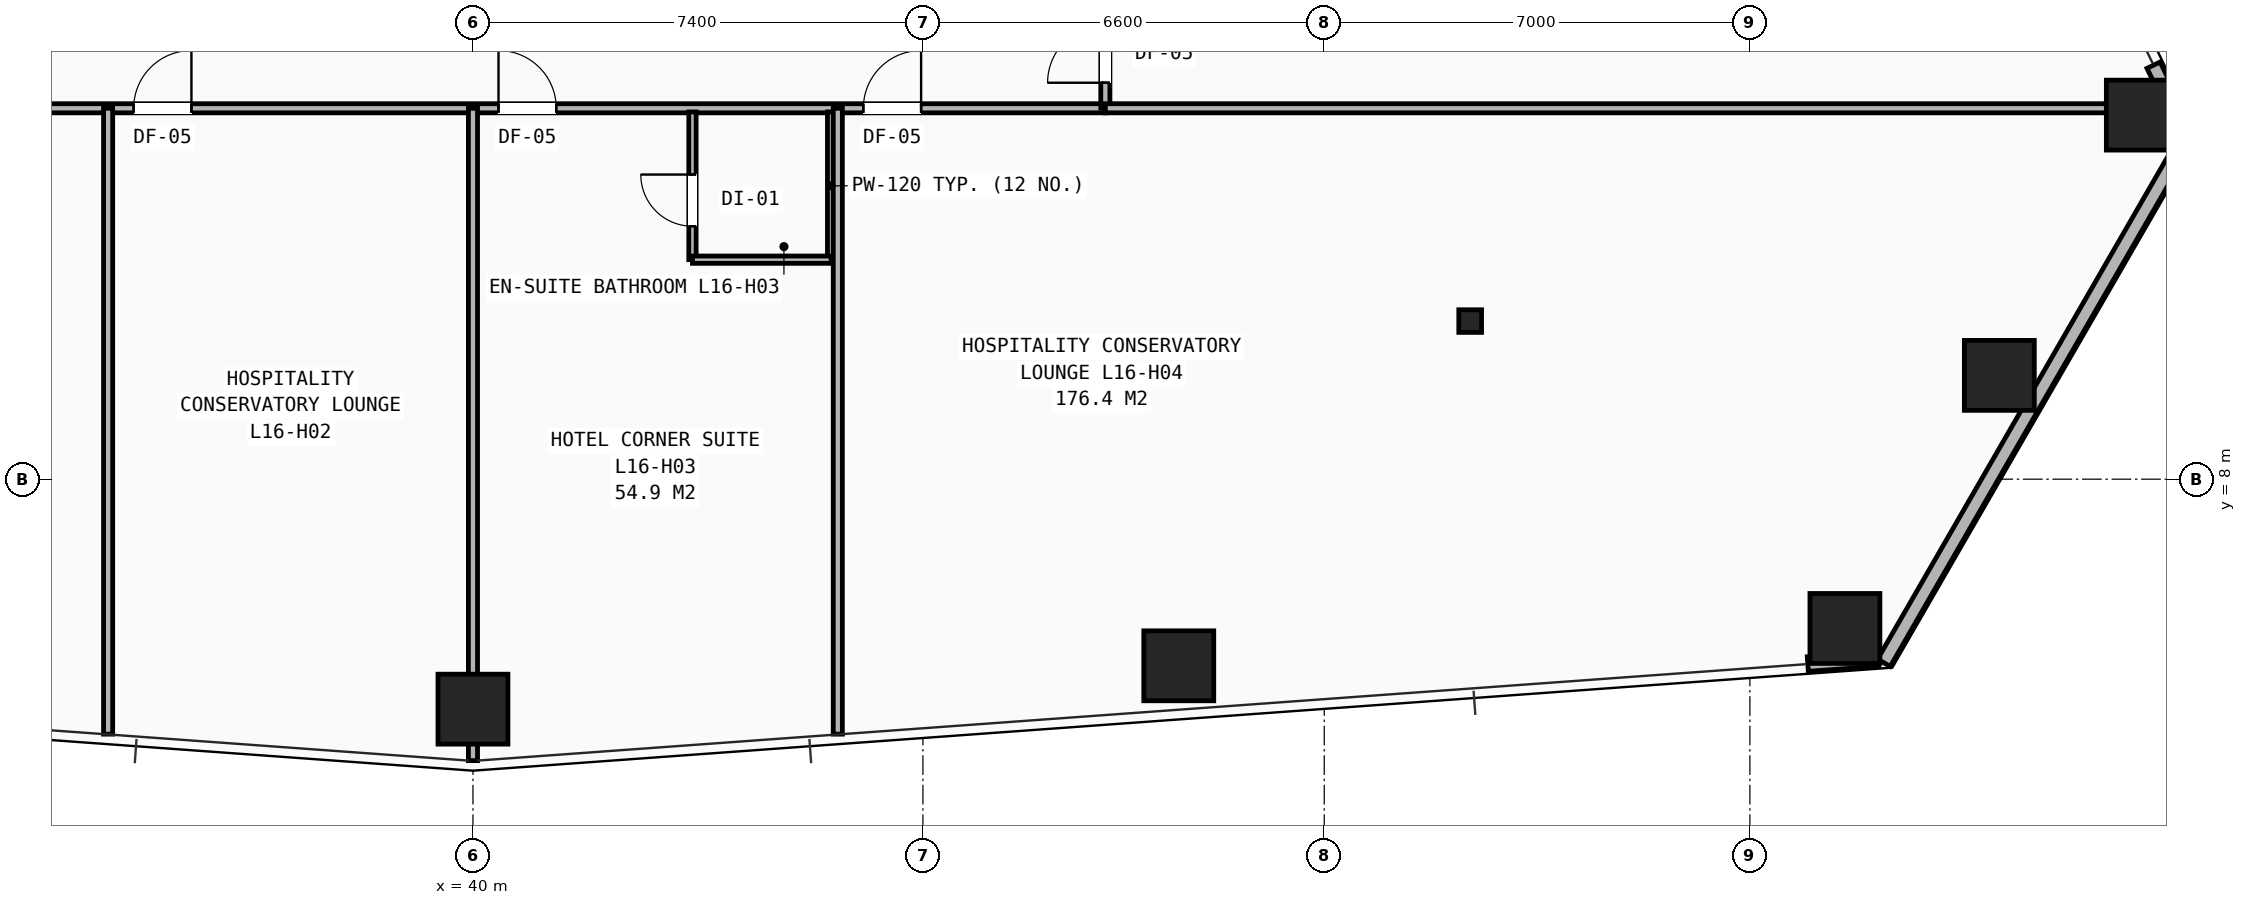
"""IFC4 building model, lengths in metres.
Left out: names, types, materials, properties, quantities, classifications, styles, units other than length and angle.
Written with IfcOpenShell. Run it as: python <this file> out.ifc"""

import sys

from ifc_helpers import new_model, si_unit, direction, frame, frame_2d, origin, origin_2d, place, context, subcontext, project, spatial, rectangle, hollow_rectangle, i_section, extrude, element, fill, save


model = new_model("IFC4")
c1 = context("Model", 3, precision=1e-05, world=origin(), true_north=direction((0.0, 1.0)))
c2 = subcontext(c1, "Body", "Model", "MODEL_VIEW")
j1 = project(units=[si_unit("LENGTHUNIT", "METRE"), si_unit("PLANEANGLEUNIT", "RADIAN")], contexts=[c1])
p1 = place(None, origin())
s1 = spatial("IfcSite", under=j1, at=p1, CompositionType="ELEMENT")
p2 = place(p1, origin())
s2 = spatial("IfcBuilding", under=s1, at=p2, CompositionType="ELEMENT")
p3 = place(p2, frame((0.0, 0.0, 59.2)))
s3 = spatial("IfcBuildingStorey", under=s2, at=p3, CompositionType="ELEMENT", Elevation=59.2)
p4 = place(p3, frame((56.4, 10.6, 0.0), z_axis=(0.0, 0.0, 1.0), x_axis=(1.0, 0.0, 0.0)))
e1 = element("IfcColumn", 1, at=p4, inside=s3, PredefinedType="COLUMN", context=c2, shape_type="SweptSolid", body=[
    extrude(i_section(OverallWidth=0.374, OverallDepth=0.372, WebThickness=0.016, FlangeThickness=0.026, at=origin_2d()), origin(), (0.0, 0.0, 1.0), 3.2),
])
for number, where, z_axis, x_axis in (
    (2, (40.0, 4.218, 0.0), (0.0, 0.0, 1.0), (1.0, 0.0, 0.0)),
    (3, (51.608, 4.93, 0.0), (0.0, 0.0, 1.0), (1.0, 0.0, 0.0)),
    (4, (62.563, 5.545, 0.0), (0.0, 0.0, 1.0), (1.0, 0.0, 0.0)),
    (5, (65.102, 9.707, 0.0), (0.0, 0.0, 1.0), (1.0, 0.0, 0.0)),
    (6, (67.437, 13.988, 0.0), (0.0, 0.0, 1.0), (1.0, 0.0, 0.0)),
):
    element("IfcColumn", number, at=place(p3, frame(where, z_axis=z_axis, x_axis=x_axis)), inside=s3, PredefinedType="COLUMN", context=c2, shape_type="SweptSolid", body=[
        extrude(hollow_rectangle(XDim=1.15, YDim=1.15, WallThickness=0.075, at=origin_2d()), origin(), (0.0, 0.0, 1.0), 3.2),
    ])
p5 = place(p3, frame((61.952, 4.959, 0.0), z_axis=(0.0, 0.0, 1.0), x_axis=(0.997371614967, 0.072455929072, 0.0)))
e7 = element("IfcWall", 7, at=p5, inside=s3, PredefinedType="SHEAR", context=c2, shape_type="SweptSolid", body=[
    extrude(rectangle(XDim=1.163, YDim=0.24, at=frame_2d((0.581, 0.0))), origin(), (0.0, 0.0, 1.0), 2.263),
])
p6 = place(p3, frame((68.247, 13.715, 0.0), z_axis=(0.0, 0.0, 1.0), x_axis=(-0.499984376209, -0.866034423996, 0.0)))
e8 = element("IfcWall", 8, at=p6, inside=s3, PredefinedType="SHEAR", context=c2, shape_type="SweptSolid", body=[
    extrude(rectangle(XDim=10.086, YDim=0.24, at=frame_2d((5.043, 0.0))), origin(), (0.0, 0.0, 1.0), 2.263),
])
p7 = place(p3, frame((68.146, 13.763, 0.0), z_axis=(0.0, 0.0, 1.0), x_axis=(-0.436005533542, 0.899943984213, 0.0)))
e9 = element("IfcWall", 9, at=p7, inside=s3, PredefinedType="SHEAR", context=c2, shape_type="SweptSolid", body=[
    extrude(rectangle(XDim=1.162, YDim=0.24, at=frame_2d((0.581, 0.0))), origin(), (0.0, 0.0, 1.0), 2.263),
])
p8 = place(p3, frame((29.6, 14.1, 0.0), z_axis=(0.0, 0.0, 1.0), x_axis=(1.0, 0.0, 0.0)))
e10 = element("IfcWall", 10, at=p8, inside=s3, PredefinedType="PARTITIONING", context=c2, shape_type="SweptSolid", body=[
    extrude(rectangle(XDim=20.8, YDim=0.15, at=frame_2d((10.4, 0.0))), origin(), (0.0, 0.0, 1.0), 2.191),
])
p9 = place(p8, frame((0.57, 0.0, 0.0)))
e11 = element("IfcOpeningElement", 11, at=p9, cuts=e10, PredefinedType="OPENING", context=c2, shape_type="SweptSolid", body=[
    extrude(rectangle(XDim=0.95, YDim=2.1, at=frame_2d((0.475, 1.05))), frame((0.0, 0.085, 0.0), z_axis=(0.0, -1.0, 0.0), x_axis=(1.0, 0.0, 0.0)), (0.0, 0.0, 1.0), 0.17),
])
p10 = place(p8, frame((4.82, 0.0, 0.0)))
e12 = element("IfcOpeningElement", 12, at=p10, cuts=e10, PredefinedType="OPENING", context=c2, shape_type="SweptSolid", body=[
    extrude(rectangle(XDim=0.95, YDim=2.1, at=frame_2d((0.475, 1.05))), frame((0.0, 0.085, 0.0), z_axis=(0.0, -1.0, 0.0), x_axis=(1.0, 0.0, 0.0)), (0.0, 0.0, 1.0), 0.17),
])
p11 = place(p8, frame((10.82, 0.0, 0.0)))
e13 = element("IfcOpeningElement", 13, at=p11, cuts=e10, PredefinedType="OPENING", context=c2, shape_type="SweptSolid", body=[
    extrude(rectangle(XDim=0.95, YDim=2.1, at=frame_2d((0.475, 1.05))), frame((0.0, 0.085, 0.0), z_axis=(0.0, -1.0, 0.0), x_axis=(1.0, 0.0, 0.0)), (0.0, 0.0, 1.0), 0.17),
])
p12 = place(p8, frame((16.82, 0.0, 0.0)))
e14 = element("IfcOpeningElement", 14, at=p12, cuts=e10, PredefinedType="OPENING", context=c2, shape_type="SweptSolid", body=[
    extrude(rectangle(XDim=0.95, YDim=2.1, at=frame_2d((0.475, 1.05))), frame((0.0, 0.085, 0.0), z_axis=(0.0, -1.0, 0.0), x_axis=(1.0, 0.0, 0.0)), (0.0, 0.0, 1.0), 0.17),
])
p13 = place(p3, frame((50.4, 14.1, 0.0), z_axis=(0.0, 0.0, 1.0), x_axis=(0.0, 1.0, 0.0)))
e15 = element("IfcWall", 15, at=p13, inside=s3, PredefinedType="PARTITIONING", context=c2, shape_type="SweptSolid", body=[
    extrude(rectangle(XDim=21.9, YDim=0.15, at=frame_2d((10.95, 0.0))), origin(), (0.0, 0.0, 1.0), 2.191),
])
p14 = place(p13, frame((0.42, 0.0, 0.0)))
e16 = element("IfcOpeningElement", 16, at=p14, cuts=e15, PredefinedType="OPENING", context=c2, shape_type="SweptSolid", body=[
    extrude(rectangle(XDim=0.95, YDim=2.1, at=frame_2d((0.475, 1.05))), frame((0.0, 0.085, 0.0), z_axis=(0.0, -1.0, 0.0), x_axis=(1.0, 0.0, 0.0)), (0.0, 0.0, 1.0), 0.17),
])
p15 = place(p13, frame((11.52, 0.0, 0.0)))
e17 = element("IfcOpeningElement", 17, at=p15, cuts=e15, PredefinedType="OPENING", context=c2, shape_type="SweptSolid", body=[
    extrude(rectangle(XDim=0.95, YDim=2.1, at=frame_2d((0.475, 1.05))), frame((0.0, 0.085, 0.0), z_axis=(0.0, -1.0, 0.0), x_axis=(1.0, 0.0, 0.0)), (0.0, 0.0, 1.0), 0.17),
])
p16 = place(p3, frame((34.0, 3.806, 0.0), z_axis=(0.0, 0.0, 1.0), x_axis=(0.0, 1.0, 0.0)))
e18 = element("IfcWall", 18, at=p16, inside=s3, PredefinedType="PARTITIONING", context=c2, shape_type="SweptSolid", body=[
    extrude(rectangle(XDim=10.294, YDim=0.15, at=frame_2d((5.147, 0.0))), origin(), (0.0, 0.0, 1.0), 2.191),
])
p17 = place(p3, frame((40.0, 3.371, 0.0), z_axis=(0.0, 0.0, 1.0), x_axis=(0.0, 1.0, 0.0)))
e19 = element("IfcWall", 19, at=p17, inside=s3, PredefinedType="PARTITIONING", context=c2, shape_type="SweptSolid", body=[
    extrude(rectangle(XDim=10.729, YDim=0.15, at=frame_2d((5.365, 0.0))), origin(), (0.0, 0.0, 1.0), 2.191),
])
p18 = place(p3, frame((43.61, 11.61, 0.0), z_axis=(0.0, 0.0, 1.0), x_axis=(0.0, 1.0, 0.0)))
e20 = element("IfcWall", 20, at=p18, inside=s3, PredefinedType="PARTITIONING", context=c2, shape_type="SweptSolid", body=[
    extrude(rectangle(XDim=2.43, YDim=0.12, at=frame_2d((1.215, 0.0))), origin(), (0.0, 0.0, 1.0), 2.98),
])
p19 = place(p18, frame((0.55, 0.0, 0.0)))
e21 = element("IfcOpeningElement", 21, at=p19, cuts=e20, PredefinedType="OPENING", context=c2, shape_type="SweptSolid", body=[
    extrude(rectangle(XDim=0.85, YDim=2.05, at=frame_2d((0.425, 1.025))), frame((0.0, 0.07, 0.0), z_axis=(0.0, -1.0, 0.0), x_axis=(1.0, 0.0, 0.0)), (0.0, 0.0, 1.0), 0.14),
])
p20 = place(p3, frame((45.89, 11.61, 0.0), z_axis=(0.0, 0.0, 1.0), x_axis=(0.0, 1.0, 0.0)))
e22 = element("IfcWall", 22, at=p20, inside=s3, PredefinedType="PARTITIONING", context=c2, shape_type="SweptSolid", body=[
    extrude(rectangle(XDim=2.43, YDim=0.12, at=frame_2d((1.215, 0.0))), origin(), (0.0, 0.0, 1.0), 2.98),
])
p21 = place(p3, frame((43.61, 11.61, 0.0), z_axis=(0.0, 0.0, 1.0), x_axis=(1.0, 0.0, 0.0)))
e23 = element("IfcWall", 23, at=p21, inside=s3, PredefinedType="PARTITIONING", context=c2, shape_type="SweptSolid", body=[
    extrude(rectangle(XDim=2.28, YDim=0.12, at=frame_2d((1.14, 0.0))), origin(), (0.0, 0.0, 1.0), 2.98),
])
p22 = place(p3, frame((46.0, 3.806, 0.0), z_axis=(0.0, 0.0, 1.0), x_axis=(0.0, 1.0, 0.0)))
e24 = element("IfcWall", 24, at=p22, inside=s3, PredefinedType="PARTITIONING", context=c2, shape_type="SweptSolid", body=[
    extrude(rectangle(XDim=10.294, YDim=0.15, at=frame_2d((5.147, 0.0))), origin(), (0.0, 0.0, 1.0), 2.268),
])
p23 = place(p3, frame((50.4, 14.1, 0.0), z_axis=(0.0, 0.0, 1.0), x_axis=(1.0, 0.0, 0.0)))
e25 = element("IfcWall", 25, at=p23, inside=s3, PredefinedType="PARTITIONING", context=c2, shape_type="SweptSolid", body=[
    extrude(rectangle(XDim=17.577, YDim=0.15, at=frame_2d((8.789, 0.0))), origin(), (0.0, 0.0, 1.0), 2.191),
])
p24 = place(p10, origin())
e26 = element("IfcDoor", 26, at=p24, inside=s3, OperationType="SINGLE_SWING_RIGHT", PredefinedType="DOOR", context=c2, shape_type="SweptSolid", body=[
    extrude(rectangle(XDim=0.95, YDim=2.1, at=frame_2d((0.475, 1.05))), frame((0.0, 0.025, 0.0), z_axis=(0.0, -1.0, 0.0), x_axis=(1.0, 0.0, 0.0)), (0.0, 0.0, 1.0), 0.05),
])
fill(e12, e26)
p25 = place(p11, origin())
e27 = element("IfcDoor", 27, at=p25, inside=s3, OperationType="SINGLE_SWING_LEFT", PredefinedType="DOOR", context=c2, shape_type="SweptSolid", body=[
    extrude(rectangle(XDim=0.95, YDim=2.1, at=frame_2d((0.475, 1.05))), frame((0.0, 0.025, 0.0), z_axis=(0.0, -1.0, 0.0), x_axis=(1.0, 0.0, 0.0)), (0.0, 0.0, 1.0), 0.05),
])
fill(e13, e27)
p26 = place(p19, origin())
e28 = element("IfcDoor", 28, at=p26, inside=s3, OperationType="SINGLE_SWING_RIGHT", PredefinedType="DOOR", context=c2, shape_type="SweptSolid", body=[
    extrude(rectangle(XDim=0.85, YDim=2.05, at=frame_2d((0.425, 1.025))), frame((0.0, 0.025, 0.0), z_axis=(0.0, -1.0, 0.0), x_axis=(1.0, 0.0, 0.0)), (0.0, 0.0, 1.0), 0.05),
])
fill(e21, e28)
p27 = place(p12, origin())
e29 = element("IfcDoor", 29, at=p27, inside=s3, OperationType="SINGLE_SWING_RIGHT", PredefinedType="DOOR", context=c2, shape_type="SweptSolid", body=[
    extrude(rectangle(XDim=0.95, YDim=2.1, at=frame_2d((0.475, 1.05))), frame((0.0, 0.025, 0.0), z_axis=(0.0, -1.0, 0.0), x_axis=(1.0, 0.0, 0.0)), (0.0, 0.0, 1.0), 0.05),
])
fill(e14, e29)
p28 = place(p14, origin())
e30 = element("IfcDoor", 30, at=p28, inside=s3, OperationType="SINGLE_SWING_LEFT", PredefinedType="DOOR", context=c2, shape_type="SweptSolid", body=[
    extrude(rectangle(XDim=0.95, YDim=2.1, at=frame_2d((0.475, 1.05))), frame((0.0, 0.025, 0.0), z_axis=(0.0, -1.0, 0.0), x_axis=(1.0, 0.0, 0.0)), (0.0, 0.0, 1.0), 0.05),
])
fill(e16, e30)
save(model, sys.argv[1])
